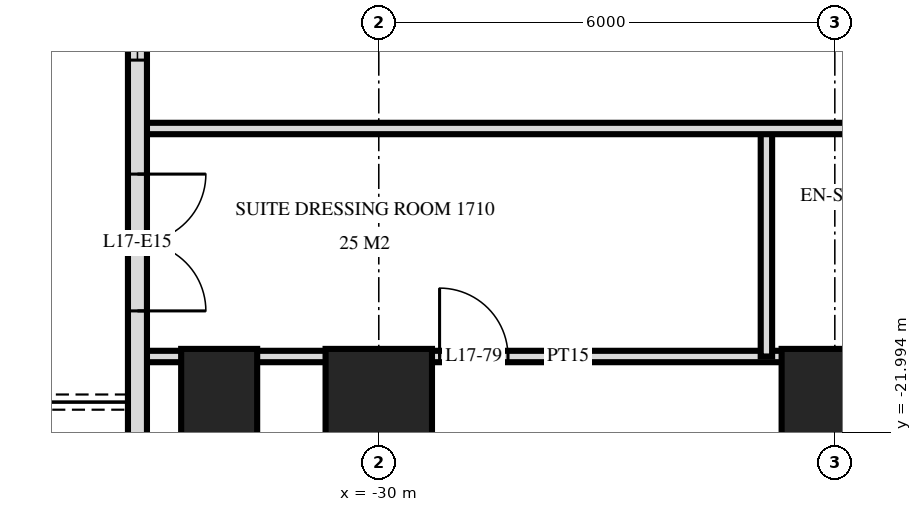
"""IFC4 building model, lengths in metres.
Left out: names, types, materials, properties, quantities, classifications, styles, units other than length and angle.
Written with IfcOpenShell. Run it as: python <this file> out.ifc"""

import sys

from ifc_helpers import new_model, si_unit, direction, frame, frame_2d, origin, origin_2d, place, context, subcontext, project, spatial, rectangle, extrude, element, fill, save


model = new_model("IFC4")
c1 = context("Model", 3, precision=1e-05, world=origin(), true_north=direction((0.0, 1.0)))
c2 = subcontext(c1, "Body", "Model", "MODEL_VIEW")
j1 = project(units=[si_unit("LENGTHUNIT", "METRE"), si_unit("PLANEANGLEUNIT", "RADIAN")], contexts=[c1])
p1 = place(None, origin())
s1 = spatial("IfcSite", under=j1, at=p1, CompositionType="ELEMENT")
p2 = place(p1, origin())
s2 = spatial("IfcBuilding", under=s1, at=p2, CompositionType="ELEMENT")
p3 = place(p2, frame((0.0, 0.0, 70.8)))
s3 = spatial("IfcBuildingStorey", under=s2, at=p3, CompositionType="ELEMENT", Elevation=70.8)
p4 = place(p3, frame((-32.1, -21.6, 0.0), z_axis=(0.0, 0.0, 1.0), x_axis=(0.0, 1.0, 0.0)))
e1 = element("IfcColumn", 1, at=p4, inside=s3, PredefinedType="COLUMN", context=c2, shape_type="SweptSolid", body=[
    extrude(rectangle(XDim=1.4, YDim=1.0, at=origin_2d()), origin(), (0.0, 0.0, 1.0), 3.6),
])
for number, where, z_axis, x_axis in (
    (2, (-30.0, -21.6, 0.0), (0.0, 0.0, 1.0), (1.0, 0.0, 0.0)),
    (3, (-24.0, -21.6, 0.0), (0.0, 0.0, 1.0), (1.0, 0.0, 0.0)),
):
    element("IfcColumn", number, at=place(p3, frame(where, z_axis=z_axis, x_axis=x_axis)), inside=s3, PredefinedType="COLUMN", context=c2, shape_type="SweptSolid", body=[
        extrude(rectangle(XDim=1.4, YDim=1.4, at=origin_2d()), origin(), (0.0, 0.0, 1.0), 3.6),
    ])
p5 = place(p3, frame((-33.175, -3.325, 0.0), z_axis=(0.0, 0.0, 1.0), x_axis=(0.0, -1.0, 0.0)))
e4 = element("IfcWall", 4, at=p5, inside=s3, PredefinedType="SOLIDWALL", context=c2, shape_type="SweptSolid", body=[
    extrude(rectangle(XDim=21.551, YDim=0.25, at=frame_2d((10.775, 0.0))), origin(), (0.0, 0.0, 1.0), 3.32),
])
p6 = place(p5, frame((6.65, 0.0, 0.0)))
e5 = element("IfcOpeningElement", 5, at=p6, cuts=e4, PredefinedType="OPENING", context=c2, shape_type="SweptSolid", body=[
    extrude(rectangle(XDim=1.8, YDim=2.4, at=frame_2d((0.9, 1.2))), frame((0.0, 0.135, 0.0), z_axis=(0.0, -1.0, 0.0), x_axis=(1.0, 0.0, 0.0)), (0.0, 0.0, 1.0), 0.27),
])
p7 = place(p5, frame((12.575, 0.0, 0.3)))
e6 = element("IfcOpeningElement", 6, at=p7, cuts=e4, PredefinedType="OPENING", context=c2, shape_type="SweptSolid", body=[
    extrude(rectangle(XDim=1.2, YDim=2.1, at=frame_2d((0.6, 1.05))), frame((0.0, 0.135, 0.0), z_axis=(0.0, -1.0, 0.0), x_axis=(1.0, 0.0, 0.0)), (0.0, 0.0, 1.0), 0.27),
])
p8 = place(p5, frame((15.275, 0.0, 0.0)))
e7 = element("IfcOpeningElement", 7, at=p8, cuts=e4, PredefinedType="OPENING", context=c2, shape_type="SweptSolid", body=[
    extrude(rectangle(XDim=1.8, YDim=2.4, at=frame_2d((0.9, 1.2))), frame((0.0, 0.135, 0.0), z_axis=(0.0, -1.0, 0.0), x_axis=(1.0, 0.0, 0.0)), (0.0, 0.0, 1.0), 0.27),
])
p9 = place(p5, frame((18.875, 0.0, 0.0)))
e8 = element("IfcOpeningElement", 8, at=p9, cuts=e4, PredefinedType="OPENING", context=c2, shape_type="SweptSolid", body=[
    extrude(rectangle(XDim=1.8, YDim=2.4, at=frame_2d((0.9, 1.2))), frame((0.0, 0.135, 0.0), z_axis=(0.0, -1.0, 0.0), x_axis=(1.0, 0.0, 0.0)), (0.0, 0.0, 1.0), 0.27),
])
p10 = place(p3, frame((-24.0, -29.22, 0.0), z_axis=(0.0, 0.0, 1.0), x_axis=(0.0, 1.0, 0.0)))
e9 = element("IfcWall", 9, at=p10, inside=s3, PredefinedType="PARTITIONING", context=c2, shape_type="SweptSolid", body=[
    extrude(rectangle(XDim=8.22, YDim=0.15, at=frame_2d((4.11, 0.0))), origin(), (0.0, 0.0, 1.0), 3.32),
])
p11 = place(p10, frame((3.59, 0.0, 0.0)))
e10 = element("IfcOpeningElement", 10, at=p11, cuts=e9, PredefinedType="OPENING", context=c2, shape_type="SweptSolid", body=[
    extrude(rectangle(XDim=0.9, YDim=2.1, at=frame_2d((0.45, 1.05))), frame((0.0, 0.085, 0.0), z_axis=(0.0, -1.0, 0.0), x_axis=(1.0, 0.0, 0.0)), (0.0, 0.0, 1.0), 0.17),
])
p12 = place(p3, frame((-24.9, -21.0, 0.0), z_axis=(0.0, 0.0, 1.0), x_axis=(0.0, 1.0, 0.0)))
e11 = element("IfcWall", 11, at=p12, inside=s3, PredefinedType="PARTITIONING", context=c2, shape_type="SweptSolid", body=[
    extrude(rectangle(XDim=3.0, YDim=0.15, at=frame_2d((1.5, 0.0))), origin(), (0.0, 0.0, 1.0), 3.32),
])
p13 = place(p3, frame((-33.12, -21.0, 0.0), z_axis=(0.0, 0.0, 1.0), x_axis=(1.0, 0.0, 0.0)))
e12 = element("IfcWall", 12, at=p13, inside=s3, PredefinedType="PARTITIONING", context=c2, shape_type="SweptSolid", body=[
    extrude(rectangle(XDim=11.22, YDim=0.15, at=frame_2d((5.61, 0.0))), origin(), (0.0, 0.0, 1.0), 3.32),
])
p14 = place(p13, frame((9.92, 0.0, 0.0)))
e13 = element("IfcOpeningElement", 13, at=p14, cuts=e12, PredefinedType="OPENING", context=c2, shape_type="SweptSolid", body=[
    extrude(rectangle(XDim=0.8, YDim=2.1, at=frame_2d((0.4, 1.05))), frame((0.0, 0.085, 0.0), z_axis=(0.0, -1.0, 0.0), x_axis=(1.0, 0.0, 0.0)), (0.0, 0.0, 1.0), 0.17),
])
p15 = place(p13, frame((3.92, 0.0, 0.0)))
e14 = element("IfcOpeningElement", 14, at=p15, cuts=e12, PredefinedType="OPENING", context=c2, shape_type="SweptSolid", body=[
    extrude(rectangle(XDim=0.9, YDim=2.1, at=frame_2d((0.45, 1.05))), frame((0.0, 0.085, 0.0), z_axis=(0.0, -1.0, 0.0), x_axis=(1.0, 0.0, 0.0)), (0.0, 0.0, 1.0), 0.17),
])
p16 = place(p3, frame((-33.12, -18.0, 0.0), z_axis=(0.0, 0.0, 1.0), x_axis=(1.0, 0.0, 0.0)))
e15 = element("IfcWall", 15, at=p16, inside=s3, PredefinedType="PARTITIONING", context=c2, shape_type="SweptSolid", body=[
    extrude(rectangle(XDim=66.24, YDim=0.15, at=frame_2d((33.12, 0.0))), origin(), (0.0, 0.0, 1.0), 3.32),
])
p17 = place(p16, frame((15.27, 0.0, 0.0)))
e16 = element("IfcOpeningElement", 16, at=p17, cuts=e15, PredefinedType="OPENING", context=c2, shape_type="SweptSolid", body=[
    extrude(rectangle(XDim=1.0, YDim=2.1, at=frame_2d((0.5, 1.05))), frame((0.0, 0.085, 0.0), z_axis=(0.0, -1.0, 0.0), x_axis=(1.0, 0.0, 0.0)), (0.0, 0.0, 1.0), 0.17),
])
p18 = place(p16, frame((21.22, 0.0, 0.0)))
e17 = element("IfcOpeningElement", 17, at=p18, cuts=e15, PredefinedType="OPENING", context=c2, shape_type="SweptSolid", body=[
    extrude(rectangle(XDim=1.0, YDim=2.1, at=frame_2d((0.5, 1.05))), frame((0.0, 0.085, 0.0), z_axis=(0.0, -1.0, 0.0), x_axis=(1.0, 0.0, 0.0)), (0.0, 0.0, 1.0), 0.17),
])
p19 = place(p16, frame((24.27, 0.0, 0.0)))
e18 = element("IfcOpeningElement", 18, at=p19, cuts=e15, PredefinedType="OPENING", context=c2, shape_type="SweptSolid", body=[
    extrude(rectangle(XDim=1.0, YDim=2.1, at=frame_2d((0.5, 1.05))), frame((0.0, 0.085, 0.0), z_axis=(0.0, -1.0, 0.0), x_axis=(1.0, 0.0, 0.0)), (0.0, 0.0, 1.0), 0.17),
])
p20 = place(p16, frame((30.97, 0.0, 0.0)))
e19 = element("IfcOpeningElement", 19, at=p20, cuts=e15, PredefinedType="OPENING", context=c2, shape_type="SweptSolid", body=[
    extrude(rectangle(XDim=1.0, YDim=2.1, at=frame_2d((0.5, 1.05))), frame((0.0, 0.085, 0.0), z_axis=(0.0, -1.0, 0.0), x_axis=(1.0, 0.0, 0.0)), (0.0, 0.0, 1.0), 0.17),
])
p21 = place(p16, frame((40.42, 0.0, 0.0)))
e20 = element("IfcOpeningElement", 20, at=p21, cuts=e15, PredefinedType="OPENING", context=c2, shape_type="SweptSolid", body=[
    extrude(rectangle(XDim=1.0, YDim=2.1, at=frame_2d((0.5, 1.05))), frame((0.0, 0.085, 0.0), z_axis=(0.0, -1.0, 0.0), x_axis=(1.0, 0.0, 0.0)), (0.0, 0.0, 1.0), 0.17),
])
p22 = place(p16, frame((43.97, 0.0, 0.0)))
e21 = element("IfcOpeningElement", 21, at=p22, cuts=e15, PredefinedType="OPENING", context=c2, shape_type="SweptSolid", body=[
    extrude(rectangle(XDim=1.0, YDim=2.1, at=frame_2d((0.5, 1.05))), frame((0.0, 0.085, 0.0), z_axis=(0.0, -1.0, 0.0), x_axis=(1.0, 0.0, 0.0)), (0.0, 0.0, 1.0), 0.17),
])
p23 = place(p16, frame((45.52, 0.0, 0.0)))
e22 = element("IfcOpeningElement", 22, at=p23, cuts=e15, PredefinedType="OPENING", context=c2, shape_type="SweptSolid", body=[
    extrude(rectangle(XDim=1.0, YDim=2.1, at=frame_2d((0.5, 1.05))), frame((0.0, 0.085, 0.0), z_axis=(0.0, -1.0, 0.0), x_axis=(1.0, 0.0, 0.0)), (0.0, 0.0, 1.0), 0.17),
])
p24 = place(p16, frame((52.97, 0.0, 0.0)))
e23 = element("IfcOpeningElement", 23, at=p24, cuts=e15, PredefinedType="OPENING", context=c2, shape_type="SweptSolid", body=[
    extrude(rectangle(XDim=1.0, YDim=2.1, at=frame_2d((0.5, 1.05))), frame((0.0, 0.085, 0.0), z_axis=(0.0, -1.0, 0.0), x_axis=(1.0, 0.0, 0.0)), (0.0, 0.0, 1.0), 0.17),
])
p25 = place(p16, frame((54.27, 0.0, 0.0)))
e24 = element("IfcOpeningElement", 24, at=p25, cuts=e15, PredefinedType="OPENING", context=c2, shape_type="SweptSolid", body=[
    extrude(rectangle(XDim=1.0, YDim=2.1, at=frame_2d((0.5, 1.05))), frame((0.0, 0.085, 0.0), z_axis=(0.0, -1.0, 0.0), x_axis=(1.0, 0.0, 0.0)), (0.0, 0.0, 1.0), 0.17),
])
p26 = place(p16, frame((13.42, 0.0, 0.0)))
e25 = element("IfcOpeningElement", 25, at=p26, cuts=e15, PredefinedType="OPENING", context=c2, shape_type="SweptSolid", body=[
    extrude(rectangle(XDim=1.0, YDim=2.1, at=frame_2d((0.5, 1.05))), frame((0.0, 0.085, 0.0), z_axis=(0.0, -1.0, 0.0), x_axis=(1.0, 0.0, 0.0)), (0.0, 0.0, 1.0), 0.17),
])
p27 = place(p16, frame((60.82, 0.0, 0.0)))
e26 = element("IfcOpeningElement", 26, at=p27, cuts=e15, PredefinedType="OPENING", context=c2, shape_type="SweptSolid", body=[
    extrude(rectangle(XDim=1.0, YDim=2.1, at=frame_2d((0.5, 1.05))), frame((0.0, 0.085, 0.0), z_axis=(0.0, -1.0, 0.0), x_axis=(1.0, 0.0, 0.0)), (0.0, 0.0, 1.0), 0.17),
])
p28 = place(p7, origin())
e27 = element("IfcWindow", 27, at=p28, inside=s3, PartitioningType="SINGLE_PANEL", PredefinedType="WINDOW", context=c2, shape_type="SweptSolid", body=[
    extrude(rectangle(XDim=1.2, YDim=2.1, at=frame_2d((0.6, 1.05))), frame((0.0, 0.03, 0.0), z_axis=(0.0, -1.0, 0.0), x_axis=(1.0, 0.0, 0.0)), (0.0, 0.0, 1.0), 0.06),
])
fill(e6, e27)
p29 = place(p8, origin())
e28 = element("IfcDoor", 28, at=p29, inside=s3, OperationType="DOUBLE_DOOR_SINGLE_SWING", PredefinedType="DOOR", context=c2, shape_type="SweptSolid", body=[
    extrude(rectangle(XDim=1.8, YDim=2.4, at=frame_2d((0.9, 1.2))), frame((0.0, 0.025, 0.0), z_axis=(0.0, -1.0, 0.0), x_axis=(1.0, 0.0, 0.0)), (0.0, 0.0, 1.0), 0.05),
])
fill(e7, e28)
p30 = place(p15, origin())
e29 = element("IfcDoor", 29, at=p30, inside=s3, OperationType="SINGLE_SWING_RIGHT", PredefinedType="DOOR", context=c2, shape_type="SweptSolid", body=[
    extrude(rectangle(XDim=0.9, YDim=2.1, at=frame_2d((0.45, 1.05))), frame((0.0, 0.025, 0.0), z_axis=(0.0, -1.0, 0.0), x_axis=(1.0, 0.0, 0.0)), (0.0, 0.0, 1.0), 0.05),
])
fill(e14, e29)
save(model, sys.argv[1])
